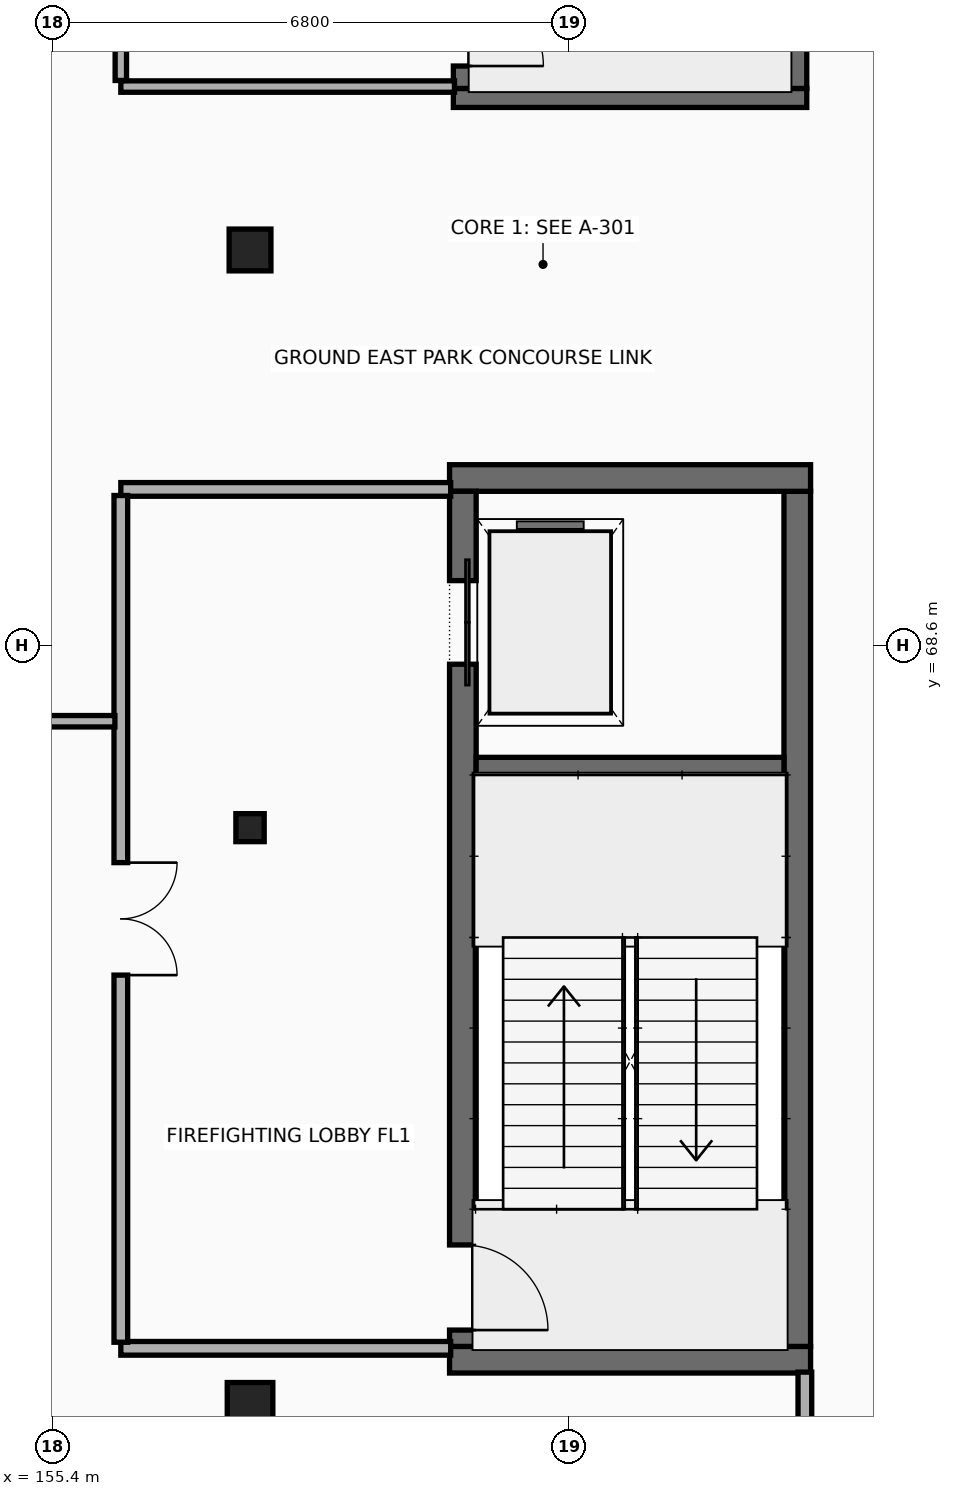
"""IFC4 building model, lengths in metres.
Left out: names, types, materials, properties, quantities, classifications, styles, units other than length and angle.
Written with IfcOpenShell. Run it as: python <this file> out.ifc"""

import sys

from ifc_helpers import new_model, si_unit, direction, frame, frame_2d, origin, origin_2d, place, context, subcontext, project, spatial, rectangle, i_section, extrude, element, fill, save


model = new_model("IFC4")
c1 = context("Model", 3, precision=1e-05, world=origin(), true_north=direction((0.0, 1.0)))
c2 = subcontext(c1, "Body", "Model", "MODEL_VIEW")
j1 = project(units=[si_unit("LENGTHUNIT", "METRE"), si_unit("PLANEANGLEUNIT", "RADIAN")], contexts=[c1])
p1 = place(None, origin())
s1 = spatial("IfcSite", under=j1, at=p1, CompositionType="ELEMENT")
p2 = place(p1, origin())
s2 = spatial("IfcBuilding", under=s1, at=p2, CompositionType="ELEMENT")
p3 = place(p2, origin())
s3 = spatial("IfcBuildingStorey", under=s2, at=p3, CompositionType="ELEMENT", Elevation=0.0)
p4 = place(p3, frame((160.625, 59.2, 0.0), z_axis=(0.0, 0.0, 1.0), x_axis=(1.0, 0.0, 0.0)))
e1 = element("IfcWall", 1, at=p4, inside=s3, PredefinedType="SHEAR", context=c2, shape_type="SweptSolid", body=[
    extrude(rectangle(XDim=4.75, YDim=0.35, at=frame_2d((2.375, 0.0))), origin(), (0.0, 0.0, 1.0), 4.8),
])
p5 = place(p3, frame((165.2, 59.375, 0.0), z_axis=(0.0, 0.0, 1.0), x_axis=(0.0, 1.0, 0.0)))
e2 = element("IfcWall", 2, at=p5, inside=s3, PredefinedType="SHEAR", context=c2, shape_type="SweptSolid", body=[
    extrude(rectangle(XDim=11.25, YDim=0.35, at=frame_2d((5.625, 0.0))), origin(), (0.0, 0.0, 1.0), 4.8),
])
p6 = place(p3, frame((165.375, 70.8, 0.0), z_axis=(0.0, 0.0, 1.0), x_axis=(-1.0, 0.0, 0.0)))
e3 = element("IfcWall", 3, at=p6, inside=s3, PredefinedType="SHEAR", context=c2, shape_type="SweptSolid", body=[
    extrude(rectangle(XDim=4.75, YDim=0.35, at=frame_2d((2.375, 0.0))), origin(), (0.0, 0.0, 1.0), 4.8),
])
p7 = place(p3, frame((160.8, 70.625, 0.0), z_axis=(0.0, 0.0, 1.0), x_axis=(0.0, -1.0, 0.0)))
e4 = element("IfcWall", 4, at=p7, inside=s3, PredefinedType="SHEAR", context=c2, shape_type="SweptSolid", body=[
    extrude(rectangle(XDim=11.25, YDim=0.35, at=frame_2d((5.625, 0.0))), origin(), (0.0, 0.0, 1.0), 4.8),
])
p8 = place(p7, frame((1.175, 0.0, 0.0)))
e5 = element("IfcOpeningElement", 5, at=p8, cuts=e4, PredefinedType="OPENING", context=c2, shape_type="SweptSolid", body=[
    extrude(rectangle(XDim=1.1, YDim=2.2, at=frame_2d((0.55, 1.1))), frame((0.0, 0.185, 0.0), z_axis=(0.0, -1.0, 0.0), x_axis=(1.0, 0.0, 0.0)), (0.0, 0.0, 1.0), 0.37),
])
p9 = place(p7, frame((9.915, 0.0, 0.0)))
e6 = element("IfcOpeningElement", 6, at=p9, cuts=e4, PredefinedType="OPENING", context=c2, shape_type="SweptSolid", body=[
    extrude(rectangle(XDim=1.12, YDim=2.16, at=frame_2d((0.56, 1.08))), frame((0.0, 0.185, 0.0), z_axis=(0.0, -1.0, 0.0), x_axis=(1.0, 0.0, 0.0)), (0.0, 0.0, 1.0), 0.37),
])
p10 = place(p3, frame((160.975, 67.0, 0.0), z_axis=(0.0, 0.0, 1.0), x_axis=(1.0, 0.0, 0.0)))
e7 = element("IfcWall", 7, at=p10, inside=s3, PredefinedType="SHEAR", context=c2, shape_type="SweptSolid", body=[
    extrude(rectangle(XDim=4.05, YDim=0.25, at=frame_2d((2.025, 0.0))), origin(), (0.0, 0.0, 1.0), 4.8),
])
p11 = place(p3, frame((160.675, 75.8, 0.0), z_axis=(0.0, 0.0, 1.0), x_axis=(1.0, 0.0, 0.0)))
e8 = element("IfcWall", 8, at=p11, inside=s3, PredefinedType="SHEAR", context=c2, shape_type="SweptSolid", body=[
    extrude(rectangle(XDim=4.65, YDim=0.25, at=frame_2d((2.325, 0.0))), origin(), (0.0, 0.0, 1.0), 4.8),
])
p12 = place(p3, frame((165.2, 75.925, 0.0), z_axis=(0.0, 0.0, 1.0), x_axis=(0.0, 1.0, 0.0)))
e9 = element("IfcWall", 9, at=p12, inside=s3, PredefinedType="SHEAR", context=c2, shape_type="SweptSolid", body=[
    extrude(rectangle(XDim=11.35, YDim=0.25, at=frame_2d((5.675, 0.0))), origin(), (0.0, 0.0, 1.0), 4.8),
])
p13 = place(p3, frame((160.8, 87.275, 0.0), z_axis=(0.0, 0.0, 1.0), x_axis=(0.0, -1.0, 0.0)))
e10 = element("IfcWall", 10, at=p13, inside=s3, PredefinedType="SHEAR", context=c2, shape_type="SweptSolid", body=[
    extrude(rectangle(XDim=11.35, YDim=0.25, at=frame_2d((5.675, 0.0))), origin(), (0.0, 0.0, 1.0), 4.8),
])
p14 = place(p13, frame((1.275, 0.0, 0.0)))
e11 = element("IfcOpeningElement", 11, at=p14, cuts=e10, PredefinedType="OPENING", context=c2, shape_type="SweptSolid", body=[
    extrude(rectangle(XDim=1.0, YDim=2.15, at=frame_2d((0.5, 1.075))), frame((0.0, 0.135, 0.0), z_axis=(0.0, -1.0, 0.0), x_axis=(1.0, 0.0, 0.0)), (0.0, 0.0, 1.0), 0.27),
])
p15 = place(p13, frame((9.995, 0.0, 0.0)))
e12 = element("IfcOpeningElement", 12, at=p15, cuts=e10, PredefinedType="OPENING", context=c2, shape_type="SweptSolid", body=[
    extrude(rectangle(XDim=1.06, YDim=2.15, at=frame_2d((0.53, 1.075))), frame((0.0, 0.135, 0.0), z_axis=(0.0, -1.0, 0.0), x_axis=(1.0, 0.0, 0.0)), (0.0, 0.0, 1.0), 0.27),
])
p16 = place(p3, frame((158.0, 58.6, 0.0), z_axis=(0.0, 0.0, 1.0), x_axis=(1.0, 0.0, 0.0)))
e13 = element("IfcColumn", 13, at=p16, inside=s3, PredefinedType="COLUMN", context=c2, shape_type="SweptSolid", body=[
    extrude(rectangle(XDim=0.6, YDim=0.6, at=origin_2d()), origin(), (0.0, 0.0, 1.0), 4.8),
])
p17 = place(p3, frame((158.0, 66.2, 0.0), z_axis=(0.0, 0.0, 1.0), x_axis=(1.0, 0.0, 0.0)))
e14 = element("IfcColumn", 14, at=p17, inside=s3, PredefinedType="COLUMN", context=c2, shape_type="SweptSolid", body=[
    extrude(i_section(OverallWidth=0.373, OverallDepth=0.368, WebThickness=0.014, FlangeThickness=0.024, at=origin_2d()), origin(), (0.0, 0.0, 1.0), 4.8),
])
p18 = place(p3, frame((158.0, 73.8, 0.0), z_axis=(0.0, 0.0, 1.0), x_axis=(1.0, 0.0, 0.0)))
e15 = element("IfcColumn", 15, at=p18, inside=s3, PredefinedType="COLUMN", context=c2, shape_type="SweptSolid", body=[
    extrude(rectangle(XDim=0.55, YDim=0.55, at=origin_2d()), origin(), (0.0, 0.0, 1.0), 4.8),
])
p19 = place(p3, frame((156.3, 59.35, 0.0), z_axis=(0.0, 0.0, 1.0), x_axis=(1.0, 0.0, 0.0)))
e16 = element("IfcWall", 16, at=p19, inside=s3, PredefinedType="PARTITIONING", context=c2, shape_type="SweptSolid", body=[
    extrude(rectangle(XDim=4.34, YDim=0.18, at=frame_2d((2.17, 0.0))), origin(), (0.0, 0.0, 1.0), 3.907),
])
p20 = place(p3, frame((160.64, 70.65, 0.0), z_axis=(0.0, 0.0, 1.0), x_axis=(-1.0, 0.0, 0.0)))
e17 = element("IfcWall", 17, at=p20, inside=s3, PredefinedType="PARTITIONING", context=c2, shape_type="SweptSolid", body=[
    extrude(rectangle(XDim=4.34, YDim=0.18, at=frame_2d((2.17, 0.0))), origin(), (0.0, 0.0, 1.0), 3.903),
])
p21 = place(p3, frame((156.3, 70.57, 0.0), z_axis=(0.0, 0.0, 1.0), x_axis=(0.0, -1.0, 0.0)))
e18 = element("IfcWall", 18, at=p21, inside=s3, PredefinedType="PARTITIONING", context=c2, shape_type="SweptSolid", body=[
    extrude(rectangle(XDim=11.14, YDim=0.18, at=frame_2d((5.57, 0.0))), origin(), (0.0, 0.0, 1.0), 4.055),
])
p22 = place(p21, frame((4.83, 0.0, 0.0)))
e19 = element("IfcOpeningElement", 19, at=p22, cuts=e18, PredefinedType="OPENING", context=c2, shape_type="SweptSolid", body=[
    extrude(rectangle(XDim=1.48, YDim=2.22, at=frame_2d((0.74, 1.11))), frame((0.0, 0.1, 0.0), z_axis=(0.0, -1.0, 0.0), x_axis=(1.0, 0.0, 0.0)), (0.0, 0.0, 1.0), 0.2),
])
p23 = place(p3, frame((156.3, 75.95, 0.0), z_axis=(0.0, 0.0, 1.0), x_axis=(1.0, 0.0, 0.0)))
e20 = element("IfcWall", 20, at=p23, inside=s3, PredefinedType="PARTITIONING", context=c2, shape_type="SweptSolid", body=[
    extrude(rectangle(XDim=4.39, YDim=0.15, at=frame_2d((2.195, 0.0))), origin(), (0.0, 0.0, 1.0), 3.831),
])
p24 = place(p3, frame((156.3, 87.17, 0.0), z_axis=(0.0, 0.0, 1.0), x_axis=(0.0, -1.0, 0.0)))
e21 = element("IfcWall", 21, at=p24, inside=s3, PredefinedType="PARTITIONING", context=c2, shape_type="SweptSolid", body=[
    extrude(rectangle(XDim=11.14, YDim=0.15, at=frame_2d((5.57, 0.0))), origin(), (0.0, 0.0, 1.0), 4.102),
])
p25 = place(p24, frame((4.88, 0.0, 0.0)))
e22 = element("IfcOpeningElement", 22, at=p25, cuts=e21, PredefinedType="OPENING", context=c2, shape_type="SweptSolid", body=[
    extrude(rectangle(XDim=1.38, YDim=2.2, at=frame_2d((0.69, 1.1))), frame((0.0, 0.085, 0.0), z_axis=(0.0, -1.0, 0.0), x_axis=(1.0, 0.0, 0.0)), (0.0, 0.0, 1.0), 0.17),
])
p26 = place(p3, frame((165.3, 57.698, 0.0), z_axis=(0.0, 0.0, 1.0), x_axis=(0.0, 1.0, 0.0)))
e23 = element("IfcWall", 23, at=p26, inside=s3, PredefinedType="PARTITIONING", context=c2, shape_type="SweptSolid", body=[
    extrude(rectangle(XDim=1.339, YDim=0.18, at=frame_2d((0.669, 0.0))), origin(), (0.0, 0.0, 1.0), 4.527),
])
p27 = place(p3, frame((128.665, 67.6, 0.0), z_axis=(0.0, 0.0, 1.0), x_axis=(1.0, 0.0, 0.0)))
e24 = element("IfcWall", 24, at=p27, inside=s3, PredefinedType="PARTITIONING", context=c2, shape_type="SweptSolid", body=[
    extrude(rectangle(XDim=27.557, YDim=0.15, at=frame_2d((13.778, 0.0))), origin(), (0.0, 0.0, 1.0), 3.805),
])
p28 = place(p8, origin())
e25 = element("IfcDoor", 25, at=p28, inside=s3, OperationType="DOUBLE_DOOR_SLIDING", PredefinedType="DOOR", context=c2, shape_type="SweptSolid", body=[
    extrude(rectangle(XDim=1.1, YDim=2.2, at=frame_2d((0.55, 1.1))), frame((0.0, 0.025, 0.0), z_axis=(0.0, -1.0, 0.0), x_axis=(1.0, 0.0, 0.0)), (0.0, 0.0, 1.0), 0.05),
])
fill(e5, e25)
p29 = place(p9, origin())
e26 = element("IfcDoor", 26, at=p29, inside=s3, OperationType="SINGLE_SWING_RIGHT", PredefinedType="DOOR", context=c2, shape_type="SweptSolid", body=[
    extrude(rectangle(XDim=1.12, YDim=2.16, at=frame_2d((0.56, 1.08))), frame((0.0, 0.025, 0.0), z_axis=(0.0, -1.0, 0.0), x_axis=(1.0, 0.0, 0.0)), (0.0, 0.0, 1.0), 0.05),
])
fill(e6, e26)
p30 = place(p15, origin())
e27 = element("IfcDoor", 27, at=p30, inside=s3, OperationType="SINGLE_SWING_RIGHT", PredefinedType="DOOR", context=c2, shape_type="SweptSolid", body=[
    extrude(rectangle(XDim=1.06, YDim=2.15, at=frame_2d((0.53, 1.075))), frame((0.0, 0.025, 0.0), z_axis=(0.0, -1.0, 0.0), x_axis=(1.0, 0.0, 0.0)), (0.0, 0.0, 1.0), 0.05),
])
fill(e12, e27)
p31 = place(p22, origin())
e28 = element("IfcDoor", 28, at=p31, inside=s3, OperationType="DOUBLE_DOOR_SINGLE_SWING", PredefinedType="DOOR", context=c2, shape_type="SweptSolid", body=[
    extrude(rectangle(XDim=1.48, YDim=2.22, at=frame_2d((0.74, 1.11))), frame((0.0, 0.025, 0.0), z_axis=(0.0, -1.0, 0.0), x_axis=(1.0, 0.0, 0.0)), (0.0, 0.0, 1.0), 0.05),
])
fill(e19, e28)
save(model, sys.argv[1])
